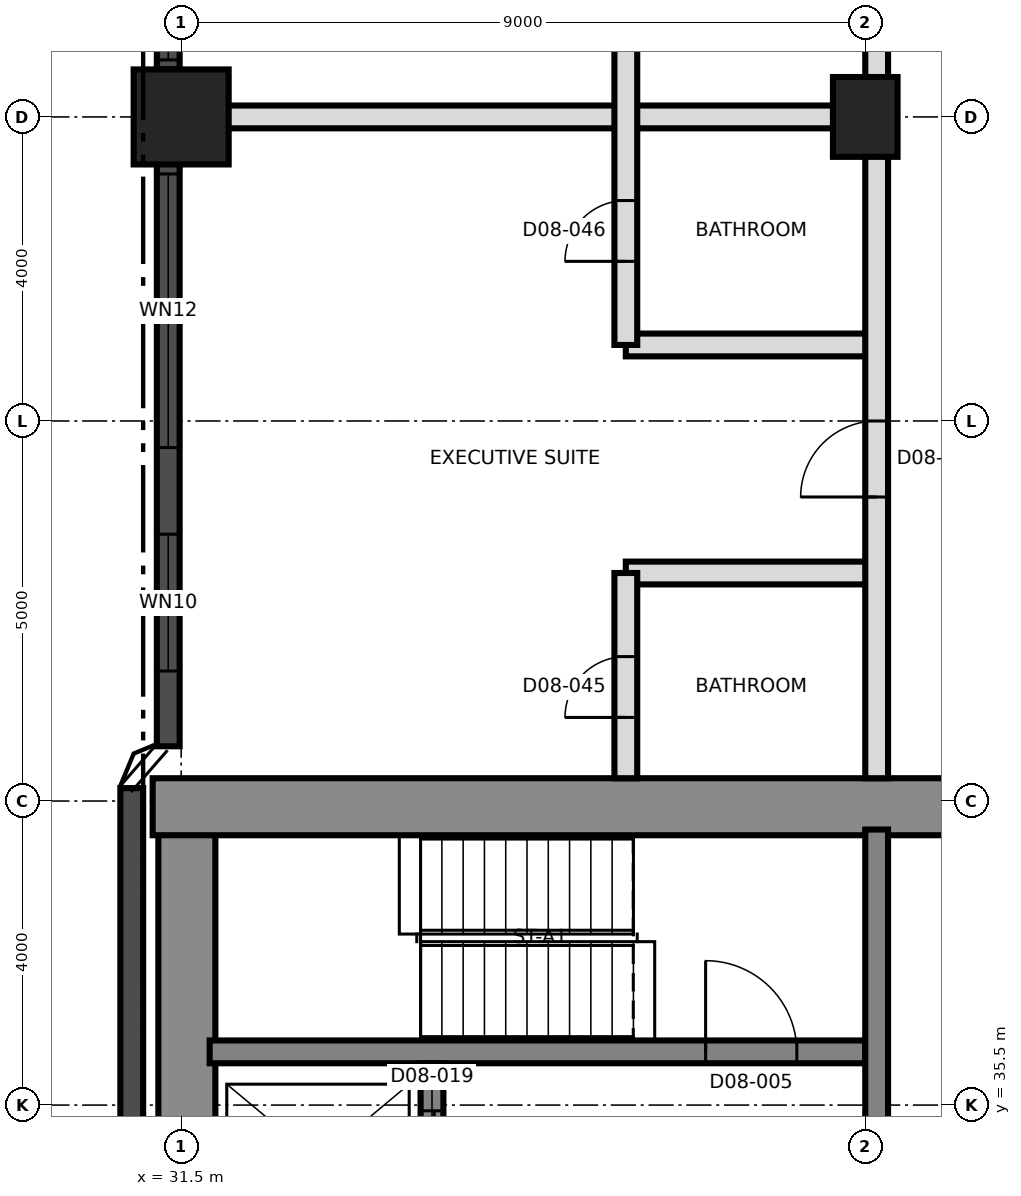
"""IFC4 building model, lengths in metres.
Left out: names, types, materials, properties, quantities, classifications, styles, units other than length and angle.
Written with IfcOpenShell. Run it as: python <this file> out.ifc"""

import sys

from ifc_helpers import new_model, si_unit, direction, frame, frame_2d, origin, origin_2d, place, context, subcontext, project, spatial, rectangle, extrude, element, fill, save


model = new_model("IFC4")
c1 = context("Model", 3, precision=1e-05, world=origin(), true_north=direction((0.0, 1.0)))
c2 = subcontext(c1, "Body", "Model", "MODEL_VIEW")
j1 = project(units=[si_unit("LENGTHUNIT", "METRE"), si_unit("PLANEANGLEUNIT", "RADIAN")], contexts=[c1])
p1 = place(None, origin())
s1 = spatial("IfcSite", under=j1, at=p1, CompositionType="ELEMENT")
p2 = place(p1, origin())
s2 = spatial("IfcBuilding", under=s1, at=p2, CompositionType="ELEMENT")
p3 = place(p2, frame((0.0, 0.0, 101.9)))
s3 = spatial("IfcBuildingStorey", under=s2, at=p3, CompositionType="ELEMENT", Elevation=101.9)
p4 = place(p3, frame((31.575, 21.875, 0.0), z_axis=(0.0, 0.0, 1.0), x_axis=(0.0, 1.0, 0.0)))
e1 = element("IfcWall", 1, at=p4, inside=s3, PredefinedType="SHEAR", context=c2, shape_type="SweptSolid", body=[
    extrude(rectangle(XDim=17.25, YDim=0.75, at=frame_2d((8.625, 0.0))), origin(), (0.0, 0.0, 1.0), 3.7),
])
p5 = place(p3, frame((31.125, 39.425, 0.0), z_axis=(0.0, 0.0, 1.0), x_axis=(1.0, 0.0, 0.0)))
e2 = element("IfcWall", 2, at=p5, inside=s3, PredefinedType="SHEAR", context=c2, shape_type="SweptSolid", body=[
    extrude(rectangle(XDim=27.0, YDim=0.75, at=frame_2d((13.5, 0.0))), origin(), (0.0, 0.0, 1.0), 3.7),
])
p6 = place(p5, frame((10.575, 0.0, 0.0)))
e3 = element("IfcOpeningElement", 3, at=p6, cuts=e2, PredefinedType="OPENING", context=c2, shape_type="SweptSolid", body=[
    extrude(rectangle(XDim=1.2, YDim=2.1, at=frame_2d((0.6, 1.05))), frame((0.0, 0.385, 0.0), z_axis=(0.0, -1.0, 0.0), x_axis=(1.0, 0.0, 0.0)), (0.0, 0.0, 1.0), 0.77),
])
p7 = place(p3, frame((31.875, 36.2, 0.0), z_axis=(0.0, 0.0, 1.0), x_axis=(1.0, 0.0, 0.0)))
e4 = element("IfcWall", 4, at=p7, inside=s3, PredefinedType="SHEAR", context=c2, shape_type="SweptSolid", body=[
    extrude(rectangle(XDim=8.625, YDim=0.3, at=frame_2d((4.312, 0.0))), origin(), (0.0, 0.0, 1.0), 3.7),
])
p8 = place(p7, frame((6.525, 0.0, 0.0)))
e5 = element("IfcOpeningElement", 5, at=p8, cuts=e4, PredefinedType="OPENING", context=c2, shape_type="SweptSolid", body=[
    extrude(rectangle(XDim=1.2, YDim=2.1, at=frame_2d((0.6, 1.05))), frame((0.0, 0.16, 0.0), z_axis=(0.0, -1.0, 0.0), x_axis=(1.0, 0.0, 0.0)), (0.0, 0.0, 1.0), 0.32),
])
p9 = place(p3, frame((40.65, 33.5, 0.0), z_axis=(0.0, 0.0, 1.0), x_axis=(0.0, 1.0, 0.0)))
e6 = element("IfcWall", 6, at=p9, inside=s3, PredefinedType="SHEAR", context=c2, shape_type="SweptSolid", body=[
    extrude(rectangle(XDim=5.625, YDim=0.3, at=frame_2d((2.812, 0.0))), origin(), (0.0, 0.0, 1.0), 3.7),
])
p10 = place(p3, frame((34.8, 33.5, 0.0), z_axis=(0.0, 0.0, 1.0), x_axis=(0.0, 1.0, 0.0)))
e7 = element("IfcWall", 7, at=p10, inside=s3, PredefinedType="SHEAR", context=c2, shape_type="SweptSolid", body=[
    extrude(rectangle(XDim=2.55, YDim=0.3, at=frame_2d((1.275, 0.0))), origin(), (0.0, 0.0, 1.0), 3.7),
])
p11 = place(p10, frame((0.625, 0.0, 0.0)))
e8 = element("IfcOpeningElement", 8, at=p11, cuts=e7, PredefinedType="OPENING", context=c2, shape_type="SweptSolid", body=[
    extrude(rectangle(XDim=1.3, YDim=2.4, at=frame_2d((0.65, 1.2))), frame((0.0, 0.16, 0.0), z_axis=(0.0, -1.0, 0.0), x_axis=(1.0, 0.0, 0.0)), (0.0, 0.0, 1.0), 0.32),
])
p12 = place(p3, frame((31.5, 48.5, 0.0), z_axis=(0.0, 0.0, 1.0), x_axis=(1.0, 0.0, 0.0)))
e9 = element("IfcColumn", 9, at=p12, inside=s3, PredefinedType="COLUMN", context=c2, shape_type="SweptSolid", body=[
    extrude(rectangle(XDim=1.25, YDim=1.25, at=origin_2d()), origin(), (0.0, 0.0, 1.0), 3.7),
])
p13 = place(p3, frame((40.5, 48.5, 0.0), z_axis=(0.0, 0.0, 1.0), x_axis=(0.0, 1.0, 0.0)))
e10 = element("IfcColumn", 10, at=p13, inside=s3, PredefinedType="COLUMN", context=c2, shape_type="SweptSolid", body=[
    extrude(rectangle(XDim=1.05, YDim=0.85, at=origin_2d()), origin(), (0.0, 0.0, 1.0), 3.7),
])
p14 = place(p3, frame((31.33, 56.875, 0.0), z_axis=(0.0, 0.0, 1.0), x_axis=(0.0, -1.0, 0.0)))
e11 = element("IfcWall", 11, at=p14, inside=s3, PredefinedType="SOLIDWALL", context=c2, shape_type="SweptSolid", body=[
    extrude(rectangle(XDim=7.75, YDim=0.3, at=frame_2d((3.875, 0.0))), origin(), (0.0, 0.0, 1.0), 2.75),
])
p15 = place(p14, frame((0.125, 0.0, 0.9)))
e12 = element("IfcOpeningElement", 12, at=p15, cuts=e11, PredefinedType="OPENING", context=c2, shape_type="SweptSolid", body=[
    extrude(rectangle(XDim=3.6, YDim=1.5, at=frame_2d((1.8, 0.75))), frame((0.0, 0.16, 0.0), z_axis=(0.0, -1.0, 0.0), x_axis=(1.0, 0.0, 0.0)), (0.0, 0.0, 1.0), 0.32),
])
p16 = place(p14, frame((4.025, 0.0, 0.9)))
e13 = element("IfcOpeningElement", 13, at=p16, cuts=e11, PredefinedType="OPENING", context=c2, shape_type="SweptSolid", body=[
    extrude(rectangle(XDim=3.6, YDim=1.5, at=frame_2d((1.8, 0.75))), frame((0.0, 0.16, 0.0), z_axis=(0.0, -1.0, 0.0), x_axis=(1.0, 0.0, 0.0)), (0.0, 0.0, 1.0), 0.32),
])
p17 = place(p3, frame((31.33, 49.125, 0.0), z_axis=(0.0, 0.0, 1.0), x_axis=(0.0, -1.0, 0.0)))
e14 = element("IfcWall", 14, at=p17, inside=s3, PredefinedType="SOLIDWALL", context=c2, shape_type="SweptSolid", body=[
    extrude(rectangle(XDim=8.905, YDim=0.3, at=frame_2d((4.452, 0.0))), origin(), (0.0, 0.0, 1.0), 3.4),
])
p18 = place(p17, frame((1.375, 0.0, 0.9)))
e15 = element("IfcOpeningElement", 15, at=p18, cuts=e14, PredefinedType="OPENING", context=c2, shape_type="SweptSolid", body=[
    extrude(rectangle(XDim=3.6, YDim=1.5, at=frame_2d((1.8, 0.75))), frame((0.0, 0.16, 0.0), z_axis=(0.0, -1.0, 0.0), x_axis=(1.0, 0.0, 0.0)), (0.0, 0.0, 1.0), 0.32),
])
p19 = place(p17, frame((6.115, 0.0, 0.3)))
e16 = element("IfcOpeningElement", 16, at=p19, cuts=e14, PredefinedType="OPENING", context=c2, shape_type="SweptSolid", body=[
    extrude(rectangle(XDim=1.8, YDim=2.4, at=frame_2d((0.9, 1.2))), frame((0.0, 0.16, 0.0), z_axis=(0.0, -1.0, 0.0), x_axis=(1.0, 0.0, 0.0)), (0.0, 0.0, 1.0), 0.32),
])
p20 = place(p3, frame((30.85, 39.67, 0.0), z_axis=(0.0, 0.0, 1.0), x_axis=(0.0, -1.0, 0.0)))
e17 = element("IfcWall", 17, at=p20, inside=s3, PredefinedType="SOLIDWALL", context=c2, shape_type="SweptSolid", body=[
    extrude(rectangle(XDim=18.31, YDim=0.3, at=frame_2d((9.155, 0.0))), origin(), (0.0, 0.0, 1.0), 3.4),
])
for number, where, z_axis, x_axis in (
    (18, (37.35, 42.5, 0.0), (0.0, 0.0, 1.0), (1.0, 0.0, 0.0)),
    (19, (37.35, 45.5, 0.0), (0.0, 0.0, 1.0), (1.0, 0.0, 0.0)),
):
    element("IfcWall", number, at=place(p3, frame(where, z_axis=z_axis, x_axis=x_axis)), inside=s3, PredefinedType="PARTITIONING", context=c2, shape_type="SweptSolid", body=[
        extrude(rectangle(XDim=3.3, YDim=0.3, at=frame_2d((1.65, 0.0))), origin(), (0.0, 0.0, 1.0), 3.4),
    ])
p21 = place(p3, frame((31.53, 48.5, 0.0), z_axis=(0.0, 0.0, 1.0), x_axis=(1.0, 0.0, 0.0)))
e20 = element("IfcWall", 20, at=p21, inside=s3, PredefinedType="PARTITIONING", context=c2, shape_type="SweptSolid", body=[
    extrude(rectangle(XDim=9.12, YDim=0.3, at=frame_2d((4.56, 0.0))), origin(), (0.0, 0.0, 1.0), 3.4),
])
p22 = place(p3, frame((37.35, 39.8, 0.0), z_axis=(0.0, 0.0, 1.0), x_axis=(0.0, 1.0, 0.0)))
e21 = element("IfcWall", 21, at=p22, inside=s3, PredefinedType="PARTITIONING", context=c2, shape_type="SweptSolid", body=[
    extrude(rectangle(XDim=2.7, YDim=0.3, at=frame_2d((1.35, 0.0))), origin(), (0.0, 0.0, 1.0), 3.4),
])
p23 = place(p22, frame((0.8, 0.0, 0.0)))
e22 = element("IfcOpeningElement", 22, at=p23, cuts=e21, PredefinedType="OPENING", context=c2, shape_type="SweptSolid", body=[
    extrude(rectangle(XDim=0.8, YDim=2.1, at=frame_2d((0.4, 1.05))), frame((0.0, 0.16, 0.0), z_axis=(0.0, -1.0, 0.0), x_axis=(1.0, 0.0, 0.0)), (0.0, 0.0, 1.0), 0.32),
])
p24 = place(p3, frame((37.35, 45.5, 0.0), z_axis=(0.0, 0.0, 1.0), x_axis=(0.0, 1.0, 0.0)))
e23 = element("IfcWall", 23, at=p24, inside=s3, PredefinedType="PARTITIONING", context=c2, shape_type="SweptSolid", body=[
    extrude(rectangle(XDim=6.0, YDim=0.3, at=frame_2d((3.0, 0.0))), origin(), (0.0, 0.0, 1.0), 3.4),
])
p25 = place(p24, frame((1.1, 0.0, 0.0)))
e24 = element("IfcOpeningElement", 24, at=p25, cuts=e23, PredefinedType="OPENING", context=c2, shape_type="SweptSolid", body=[
    extrude(rectangle(XDim=0.8, YDim=2.1, at=frame_2d((0.4, 1.05))), frame((0.0, 0.16, 0.0), z_axis=(0.0, -1.0, 0.0), x_axis=(1.0, 0.0, 0.0)), (0.0, 0.0, 1.0), 0.32),
])
p26 = place(p24, frame((4.1, 0.0, 0.0)))
e25 = element("IfcOpeningElement", 25, at=p26, cuts=e23, PredefinedType="OPENING", context=c2, shape_type="SweptSolid", body=[
    extrude(rectangle(XDim=0.8, YDim=2.1, at=frame_2d((0.4, 1.05))), frame((0.0, 0.16, 0.0), z_axis=(0.0, -1.0, 0.0), x_axis=(1.0, 0.0, 0.0)), (0.0, 0.0, 1.0), 0.32),
])
p27 = place(p3, frame((40.65, 39.8, 0.0), z_axis=(0.0, 0.0, 1.0), x_axis=(0.0, 1.0, 0.0)))
e26 = element("IfcWall", 26, at=p27, inside=s3, PredefinedType="PARTITIONING", context=c2, shape_type="SweptSolid", body=[
    extrude(rectangle(XDim=35.67, YDim=0.3, at=frame_2d((17.835, 0.0))), origin(), (0.0, 0.0, 1.0), 3.4),
])
p28 = place(p27, frame((3.7, 0.0, 0.0)))
e27 = element("IfcOpeningElement", 27, at=p28, cuts=e26, PredefinedType="OPENING", context=c2, shape_type="SweptSolid", body=[
    extrude(rectangle(XDim=1.0, YDim=2.4, at=frame_2d((0.5, 1.2))), frame((0.0, 0.16, 0.0), z_axis=(0.0, -1.0, 0.0), x_axis=(1.0, 0.0, 0.0)), (0.0, 0.0, 1.0), 0.32),
])
p29 = place(p27, frame((12.7, 0.0, 0.0)))
e28 = element("IfcOpeningElement", 28, at=p29, cuts=e26, PredefinedType="OPENING", context=c2, shape_type="SweptSolid", body=[
    extrude(rectangle(XDim=1.0, YDim=2.4, at=frame_2d((0.5, 1.2))), frame((0.0, 0.16, 0.0), z_axis=(0.0, -1.0, 0.0), x_axis=(1.0, 0.0, 0.0)), (0.0, 0.0, 1.0), 0.32),
])
p30 = place(p27, frame((21.2, 0.0, 0.0)))
e29 = element("IfcOpeningElement", 29, at=p30, cuts=e26, PredefinedType="OPENING", context=c2, shape_type="SweptSolid", body=[
    extrude(rectangle(XDim=1.0, YDim=2.4, at=frame_2d((0.5, 1.2))), frame((0.0, 0.16, 0.0), z_axis=(0.0, -1.0, 0.0), x_axis=(1.0, 0.0, 0.0)), (0.0, 0.0, 1.0), 0.32),
])
p31 = place(p16, origin())
e30 = element("IfcWindow", 30, at=p31, inside=s3, PartitioningType="SINGLE_PANEL", PredefinedType="WINDOW", context=c2, shape_type="SweptSolid", body=[
    extrude(rectangle(XDim=3.6, YDim=1.5, at=frame_2d((1.8, 0.75))), frame((0.0, 0.03, 0.0), z_axis=(0.0, -1.0, 0.0), x_axis=(1.0, 0.0, 0.0)), (0.0, 0.0, 1.0), 0.06),
])
fill(e13, e30)
p32 = place(p18, origin())
e31 = element("IfcWindow", 31, at=p32, inside=s3, PartitioningType="SINGLE_PANEL", PredefinedType="WINDOW", context=c2, shape_type="SweptSolid", body=[
    extrude(rectangle(XDim=3.6, YDim=1.5, at=frame_2d((1.8, 0.75))), frame((0.0, 0.03, 0.0), z_axis=(0.0, -1.0, 0.0), x_axis=(1.0, 0.0, 0.0)), (0.0, 0.0, 1.0), 0.06),
])
fill(e15, e31)
p33 = place(p19, origin())
e32 = element("IfcWindow", 32, at=p33, inside=s3, PartitioningType="SINGLE_PANEL", PredefinedType="WINDOW", context=c2, shape_type="SweptSolid", body=[
    extrude(rectangle(XDim=1.8, YDim=2.4, at=frame_2d((0.9, 1.2))), frame((0.0, 0.03, 0.0), z_axis=(0.0, -1.0, 0.0), x_axis=(1.0, 0.0, 0.0)), (0.0, 0.0, 1.0), 0.06),
])
fill(e16, e32)
p34 = place(p8, origin())
e33 = element("IfcDoor", 33, at=p34, inside=s3, OperationType="SINGLE_SWING_RIGHT", PredefinedType="DOOR", context=c2, shape_type="SweptSolid", body=[
    extrude(rectangle(XDim=1.2, YDim=2.1, at=frame_2d((0.6, 1.05))), frame((0.0, 0.025, 0.0), z_axis=(0.0, -1.0, 0.0), x_axis=(1.0, 0.0, 0.0)), (0.0, 0.0, 1.0), 0.05),
])
fill(e5, e33)
p35 = place(p11, origin())
e34 = element("IfcDoor", 34, at=p35, inside=s3, OperationType="SLIDING_TO_LEFT", PredefinedType="DOOR", context=c2, shape_type="SweptSolid", body=[
    extrude(rectangle(XDim=1.3, YDim=2.4, at=frame_2d((0.65, 1.2))), frame((0.0, 0.025, 0.0), z_axis=(0.0, -1.0, 0.0), x_axis=(1.0, 0.0, 0.0)), (0.0, 0.0, 1.0), 0.05),
])
fill(e8, e34)
p36 = place(p23, origin())
e35 = element("IfcDoor", 35, at=p36, inside=s3, OperationType="SINGLE_SWING_LEFT", PredefinedType="DOOR", context=c2, shape_type="SweptSolid", body=[
    extrude(rectangle(XDim=0.8, YDim=2.1, at=frame_2d((0.4, 1.05))), frame((0.0, 0.025, 0.0), z_axis=(0.0, -1.0, 0.0), x_axis=(1.0, 0.0, 0.0)), (0.0, 0.0, 1.0), 0.05),
])
fill(e22, e35)
p37 = place(p25, origin())
e36 = element("IfcDoor", 36, at=p37, inside=s3, OperationType="SINGLE_SWING_LEFT", PredefinedType="DOOR", context=c2, shape_type="SweptSolid", body=[
    extrude(rectangle(XDim=0.8, YDim=2.1, at=frame_2d((0.4, 1.05))), frame((0.0, 0.025, 0.0), z_axis=(0.0, -1.0, 0.0), x_axis=(1.0, 0.0, 0.0)), (0.0, 0.0, 1.0), 0.05),
])
fill(e24, e36)
p38 = place(p28, origin())
e37 = element("IfcDoor", 37, at=p38, inside=s3, OperationType="SINGLE_SWING_RIGHT", PredefinedType="DOOR", context=c2, shape_type="SweptSolid", body=[
    extrude(rectangle(XDim=1.0, YDim=2.4, at=frame_2d((0.5, 1.2))), frame((0.0, 0.025, 0.0), z_axis=(0.0, -1.0, 0.0), x_axis=(1.0, 0.0, 0.0)), (0.0, 0.0, 1.0), 0.05),
])
fill(e27, e37)
save(model, sys.argv[1])
